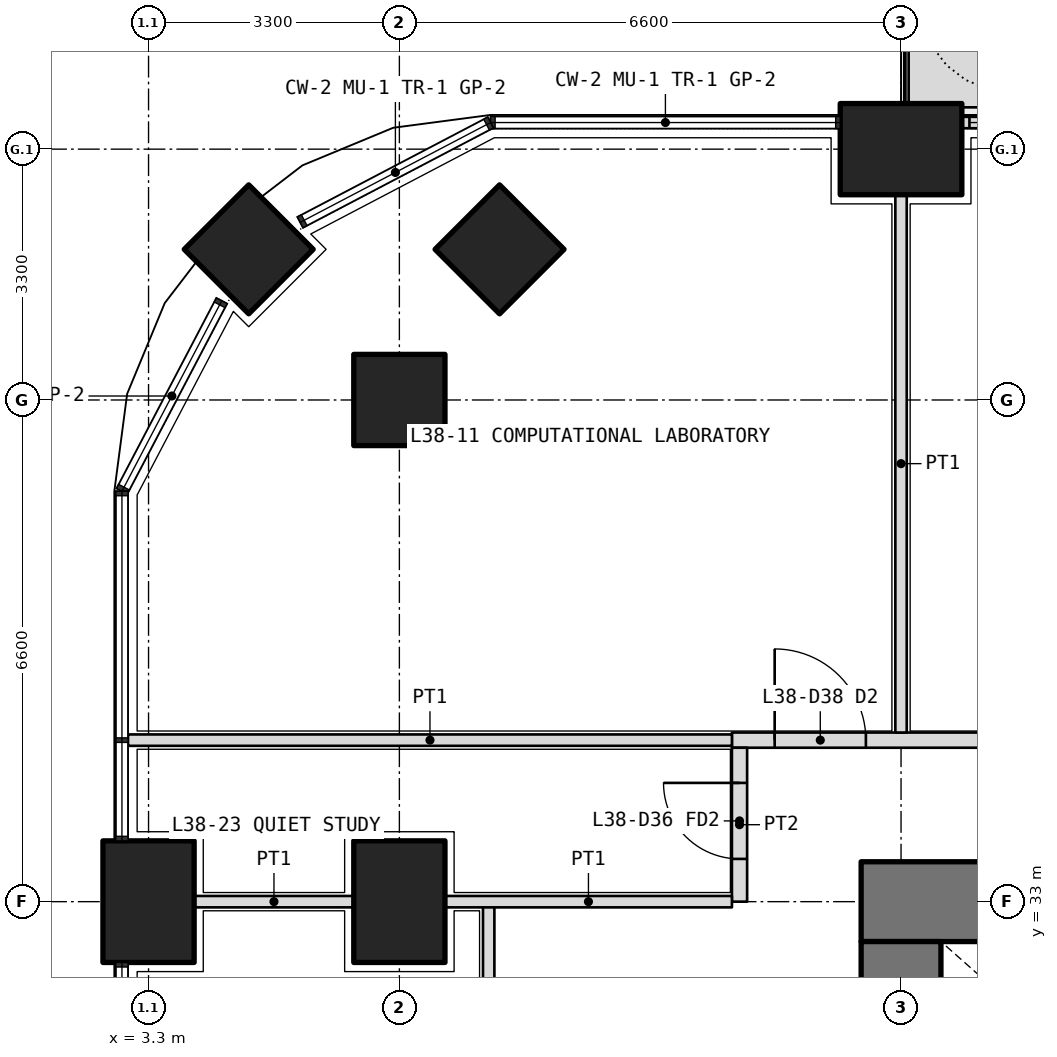
"""IFC4 building model, lengths in metres.
Left out: names, types, materials, properties, quantities, classifications, styles, units other than length and angle.
Written with IfcOpenShell. Run it as: python <this file> out.ifc"""

import sys

from ifc_helpers import new_model, si_unit, direction, frame, frame_2d, origin, origin_2d, place, context, subcontext, project, spatial, polyline, rectangle, outline, extrude, element, fill, save


model = new_model("IFC4")
c1 = context("Model", 3, precision=1e-05, world=origin(), true_north=direction((0.0, 1.0)))
c2 = subcontext(c1, "Body", "Model", "MODEL_VIEW")
j1 = project(units=[si_unit("LENGTHUNIT", "METRE"), si_unit("PLANEANGLEUNIT", "RADIAN")], contexts=[c1])
p1 = place(None, origin())
s1 = spatial("IfcSite", under=j1, at=p1, CompositionType="ELEMENT")
p2 = place(p1, origin())
s2 = spatial("IfcBuilding", under=s1, at=p2, CompositionType="ELEMENT")
p3 = place(p2, frame((0.0, 0.0, 168.3)))
s3 = spatial("IfcBuildingStorey", under=s2, at=p3, CompositionType="ELEMENT", Elevation=168.3)
p4 = place(p3, frame((4.618, 41.582, 0.0), z_axis=(0.0, 0.0, 1.0), x_axis=(0.707106781187, 0.707106781187, 0.0)))
e1 = element("IfcColumn", 1, at=p4, inside=s3, PredefinedType="COLUMN", context=c2, shape_type="SweptSolid", body=[
    extrude(rectangle(XDim=1.2, YDim=1.2, at=origin_2d()), origin(), (0.0, 0.0, 1.0), 4.2),
])
for number, where, z_axis, x_axis in (
    (2, (3.3, 33.0, 0.0), (0.0, 0.0, 1.0), (0.0, 1.0, 0.0)),
    (3, (13.2, 42.9, 0.0), (0.0, 0.0, 1.0), (1.0, 0.0, 0.0)),
):
    element("IfcColumn", number, at=place(p3, frame(where, z_axis=z_axis, x_axis=x_axis)), inside=s3, PredefinedType="COLUMN", context=c2, shape_type="SweptSolid", body=[
        extrude(rectangle(XDim=1.6, YDim=1.2, at=origin_2d()), origin(), (0.0, 0.0, 1.0), 4.2),
    ])
for number, where, z_axis, x_axis in (
    (4, (6.6, 39.6, 0.0), (0.0, 0.0, 1.0), (1.0, 0.0, 0.0)),
    (5, (7.918, 41.582, 0.0), (0.0, 0.0, 1.0), (0.707, 0.707, 0.0)),
):
    element("IfcColumn", number, at=place(p3, frame(where, z_axis=z_axis, x_axis=x_axis)), inside=s3, PredefinedType="COLUMN", context=c2, shape_type="SweptSolid", body=[
        extrude(rectangle(XDim=1.2, YDim=1.2, at=origin_2d()), origin(), (0.0, 0.0, 1.0), 4.2),
    ])
p5 = place(p3, frame((6.6, 33.0, 0.0), z_axis=(0.0, 0.0, 1.0), x_axis=(0.0, 1.0, 0.0)))
e6 = element("IfcColumn", 6, at=p5, inside=s3, PredefinedType="COLUMN", context=c2, shape_type="SweptSolid", body=[
    extrude(rectangle(XDim=1.6, YDim=1.2, at=origin_2d()), origin(), (0.0, 0.0, 1.0), 4.2),
])
p6 = place(p3, origin())
e7 = element("IfcWall", 7, at=p6, inside=s3, PredefinedType="USERDEFINED", context=c2, shape_type="SweptSolid", body=[
    extrude(outline(polyline([(13.3, 43.45), (15.75, 43.45), (15.75, 44.45), (13.3, 44.45), (13.3, 43.45)]), holes=[polyline([(13.45, 43.6), (15.6, 43.6), (15.6, 44.3), (13.45, 44.3), (13.45, 43.6)])]), origin(), (0.0, 0.0, 1.0), 1.05),
])
p7 = place(p3, frame((19.0, 43.25, 0.0), z_axis=(0.0, 0.0, 1.0), x_axis=(-1.0, 0.0, 0.0)))
e8 = element("IfcWall", 8, at=p7, inside=s3, PredefinedType="SOLIDWALL", context=c2, shape_type="SweptSolid", body=[
    extrude(rectangle(XDim=5.0, YDim=0.15, at=frame_2d((2.5, 0.0))), origin(), (0.0, 0.0, 1.0), 2.7),
])
p8 = place(p7, frame((1.25, 0.0, 0.0)))
e9 = element("IfcOpeningElement", 9, at=p8, cuts=e8, PredefinedType="OPENING", context=c2, shape_type="SweptSolid", body=[
    extrude(rectangle(XDim=1.0, YDim=2.4, at=frame_2d((0.5, 1.2))), frame((0.0, 0.085, 0.0), z_axis=(0.0, -1.0, 0.0), x_axis=(1.0, 0.0, 0.0)), (0.0, 0.0, 1.0), 0.17),
])
p9 = place(p7, frame((0.1, 0.0, 0.1)))
e10 = element("IfcOpeningElement", 10, at=p9, cuts=e8, PredefinedType="OPENING", context=c2, shape_type="SweptSolid", body=[
    extrude(rectangle(XDim=1.05, YDim=2.3, at=frame_2d((0.525, 1.15))), frame((0.0, 0.085, 0.0), z_axis=(0.0, -1.0, 0.0), x_axis=(1.0, 0.0, 0.0)), (0.0, 0.0, 1.0), 0.17),
])
p10 = place(p7, frame((2.75, 0.0, 0.1)))
e11 = element("IfcOpeningElement", 11, at=p10, cuts=e8, PredefinedType="OPENING", context=c2, shape_type="SweptSolid", body=[
    extrude(rectangle(XDim=2.15, YDim=2.3, at=frame_2d((1.075, 1.15))), frame((0.0, 0.085, 0.0), z_axis=(0.0, -1.0, 0.0), x_axis=(1.0, 0.0, 0.0)), (0.0, 0.0, 1.0), 0.17),
])
p11 = place(p3, frame((40.125, 33.0, 0.0), z_axis=(0.0, 0.0, 1.0), x_axis=(-1.0, 0.0, 0.0)))
e12 = element("IfcWall", 12, at=p11, inside=s3, PredefinedType="SHEAR", context=c2, shape_type="SweptSolid", body=[
    extrude(rectangle(XDim=27.45, YDim=1.05, at=frame_2d((13.725, 0.0))), origin(), (0.0, 0.0, 1.0), 4.2),
])
p12 = place(p3, frame((13.2, 32.475, 0.0), z_axis=(0.0, 0.0, 1.0), x_axis=(0.0, -1.0, 0.0)))
e13 = element("IfcWall", 13, at=p12, inside=s3, PredefinedType="SHEAR", context=c2, shape_type="SweptSolid", body=[
    extrude(rectangle(XDim=18.75, YDim=1.05, at=frame_2d((9.375, 0.0))), origin(), (0.0, 0.0, 1.0), 4.2),
])
p13 = place(p12, frame((14.125, 0.0, 0.0)))
e14 = element("IfcOpeningElement", 14, at=p13, cuts=e13, PredefinedType="OPENING", context=c2, shape_type="SweptSolid", body=[
    extrude(rectangle(XDim=1.6, YDim=2.1, at=frame_2d((0.8, 1.05))), frame((0.0, 0.535, 0.0), z_axis=(0.0, -1.0, 0.0), x_axis=(1.0, 0.0, 0.0)), (0.0, 0.0, 1.0), 1.07),
])
p14 = place(p12, frame((3.325, 0.0, 0.0)))
e15 = element("IfcOpeningElement", 15, at=p14, cuts=e13, PredefinedType="OPENING", context=c2, shape_type="SweptSolid", body=[
    extrude(rectangle(XDim=1.6, YDim=2.1, at=frame_2d((0.8, 1.05))), frame((0.0, 0.535, 0.0), z_axis=(0.0, -1.0, 0.0), x_axis=(1.0, 0.0, 0.0)), (0.0, 0.0, 1.0), 1.07),
])
p15 = place(p3, frame((10.975, 35.125, 0.0), z_axis=(0.0, 0.0, 1.0), x_axis=(1.0, 0.0, 0.0)))
e16 = element("IfcWall", 16, at=p15, inside=s3, PredefinedType="PARTITIONING", context=c2, shape_type="SweptSolid", body=[
    extrude(rectangle(XDim=30.85, YDim=0.2, at=frame_2d((15.425, 0.0))), origin(), (0.0, 0.0, 1.0), 2.85),
])
p16 = place(p15, frame((0.562, 0.0, 0.0)))
e17 = element("IfcOpeningElement", 17, at=p16, cuts=e16, PredefinedType="OPENING", context=c2, shape_type="SweptSolid", body=[
    extrude(rectangle(XDim=1.2, YDim=2.1, at=frame_2d((0.6, 1.05))), frame((0.0, 0.11, 0.0), z_axis=(0.0, -1.0, 0.0), x_axis=(1.0, 0.0, 0.0)), (0.0, 0.0, 1.0), 0.22),
])
p17 = place(p15, frame((8.225, 0.0, 0.0)))
e18 = element("IfcOpeningElement", 18, at=p17, cuts=e16, PredefinedType="OPENING", context=c2, shape_type="SweptSolid", body=[
    extrude(rectangle(XDim=1.2, YDim=2.1, at=frame_2d((0.6, 1.05))), frame((0.0, 0.11, 0.0), z_axis=(0.0, -1.0, 0.0), x_axis=(1.0, 0.0, 0.0)), (0.0, 0.0, 1.0), 0.22),
])
p18 = place(p15, frame((17.025, 0.0, 0.0)))
e19 = element("IfcOpeningElement", 19, at=p18, cuts=e16, PredefinedType="OPENING", context=c2, shape_type="SweptSolid", body=[
    extrude(rectangle(XDim=1.0, YDim=2.1, at=frame_2d((0.5, 1.05))), frame((0.0, 0.11, 0.0), z_axis=(0.0, -1.0, 0.0), x_axis=(1.0, 0.0, 0.0)), (0.0, 0.0, 1.0), 0.22),
])
p19 = place(p15, frame((20.325, 0.0, 0.0)))
e20 = element("IfcOpeningElement", 20, at=p19, cuts=e16, PredefinedType="OPENING", context=c2, shape_type="SweptSolid", body=[
    extrude(rectangle(XDim=1.0, YDim=2.1, at=frame_2d((0.5, 1.05))), frame((0.0, 0.11, 0.0), z_axis=(0.0, -1.0, 0.0), x_axis=(1.0, 0.0, 0.0)), (0.0, 0.0, 1.0), 0.22),
])
p20 = place(p15, frame((23.075, 0.0, 0.0)))
e21 = element("IfcOpeningElement", 21, at=p20, cuts=e16, PredefinedType="OPENING", context=c2, shape_type="SweptSolid", body=[
    extrude(rectangle(XDim=1.2, YDim=2.1, at=frame_2d((0.6, 1.05))), frame((0.0, 0.11, 0.0), z_axis=(0.0, -1.0, 0.0), x_axis=(1.0, 0.0, 0.0)), (0.0, 0.0, 1.0), 0.22),
])
p21 = place(p15, frame((27.438, 0.0, 0.0)))
e22 = element("IfcOpeningElement", 22, at=p21, cuts=e16, PredefinedType="OPENING", context=c2, shape_type="SweptSolid", body=[
    extrude(rectangle(XDim=1.2, YDim=2.1, at=frame_2d((0.6, 1.05))), frame((0.0, 0.11, 0.0), z_axis=(0.0, -1.0, 0.0), x_axis=(1.0, 0.0, 0.0)), (0.0, 0.0, 1.0), 0.22),
])
p22 = place(p3, frame((11.075, 33.0, 0.0), z_axis=(0.0, 0.0, 1.0), x_axis=(0.0, 1.0, 0.0)))
e23 = element("IfcWall", 23, at=p22, inside=s3, PredefinedType="PARTITIONING", context=c2, shape_type="SweptSolid", body=[
    extrude(rectangle(XDim=2.025, YDim=0.2, at=frame_2d((1.012, 0.0))), origin(), (0.0, 0.0, 1.0), 2.85),
])
p23 = place(p22, frame((0.562, 0.0, 0.0)))
e24 = element("IfcOpeningElement", 24, at=p23, cuts=e23, PredefinedType="OPENING", context=c2, shape_type="SweptSolid", body=[
    extrude(rectangle(XDim=1.0, YDim=2.1, at=frame_2d((0.5, 1.05))), frame((0.0, 0.11, 0.0), z_axis=(0.0, -1.0, 0.0), x_axis=(1.0, 0.0, 0.0)), (0.0, 0.0, 1.0), 0.22),
])
p24 = place(p3, frame((3.03, 35.125, 0.0), z_axis=(0.0, 0.0, 1.0), x_axis=(1.0, 0.0, 0.0)))
e25 = element("IfcWall", 25, at=p24, inside=s3, PredefinedType="PARTITIONING", context=c2, shape_type="SweptSolid", body=[
    extrude(rectangle(XDim=7.945, YDim=0.15, at=frame_2d((3.973, 0.0))), origin(), (0.0, 0.0, 1.0), 2.7),
])
p25 = place(p3, frame((13.2, 42.3, 0.0), z_axis=(0.0, 0.0, 1.0), x_axis=(0.0, -1.0, 0.0)))
e26 = element("IfcWall", 26, at=p25, inside=s3, PredefinedType="PARTITIONING", context=c2, shape_type="SweptSolid", body=[
    extrude(rectangle(XDim=7.075, YDim=0.15, at=frame_2d((3.538, 0.0))), origin(), (0.0, 0.0, 1.0), 2.85),
])
p26 = place(p3, frame((7.775, 26.4, 0.0), z_axis=(0.0, 0.0, 1.0), x_axis=(0.0, 1.0, 0.0)))
e27 = element("IfcWall", 27, at=p26, inside=s3, PredefinedType="PARTITIONING", context=c2, shape_type="SweptSolid", body=[
    extrude(rectangle(XDim=6.6, YDim=0.15, at=frame_2d((3.3, 0.0))), origin(), (0.0, 0.0, 1.0), 2.85),
])
p27 = place(p26, frame((2.7, 0.0, 0.0)))
e28 = element("IfcOpeningElement", 28, at=p27, cuts=e27, PredefinedType="OPENING", context=c2, shape_type="SweptSolid", body=[
    extrude(rectangle(XDim=1.2, YDim=2.1, at=frame_2d((0.6, 1.05))), frame((0.0, 0.085, 0.0), z_axis=(0.0, -1.0, 0.0), x_axis=(1.0, 0.0, 0.0)), (0.0, 0.0, 1.0), 0.17),
])
p28 = place(p3, frame((3.9, 33.0, 0.0), z_axis=(0.0, 0.0, 1.0), x_axis=(1.0, 0.0, 0.0)))
e29 = element("IfcWall", 29, at=p28, inside=s3, PredefinedType="PARTITIONING", context=c2, shape_type="SweptSolid", body=[
    extrude(rectangle(XDim=2.1, YDim=0.15, at=frame_2d((1.05, 0.0))), origin(), (0.0, 0.0, 1.0), 2.85),
])
p29 = place(p3, frame((7.2, 33.0, 0.0), z_axis=(0.0, 0.0, 1.0), x_axis=(1.0, 0.0, 0.0)))
e30 = element("IfcWall", 30, at=p29, inside=s3, PredefinedType="PARTITIONING", context=c2, shape_type="SweptSolid", body=[
    extrude(rectangle(XDim=3.775, YDim=0.15, at=frame_2d((1.888, 0.0))), origin(), (0.0, 0.0, 1.0), 2.85),
])
p30 = place(p10, origin())
e31 = element("IfcWindow", 31, at=p30, inside=s3, PartitioningType="SINGLE_PANEL", PredefinedType="WINDOW", context=c2, shape_type="SweptSolid", body=[
    extrude(rectangle(XDim=2.15, YDim=2.3, at=frame_2d((1.075, 1.15))), frame((0.0, 0.03, 0.0), z_axis=(0.0, -1.0, 0.0), x_axis=(1.0, 0.0, 0.0)), (0.0, 0.0, 1.0), 0.06),
])
fill(e11, e31)
p31 = place(p16, origin())
e32 = element("IfcDoor", 32, at=p31, inside=s3, OperationType="DOUBLE_DOOR_SINGLE_SWING", PredefinedType="DOOR", context=c2, shape_type="SweptSolid", body=[
    extrude(rectangle(XDim=1.2, YDim=2.1, at=frame_2d((0.6, 1.05))), frame((0.0, 0.025, 0.0), z_axis=(0.0, -1.0, 0.0), x_axis=(1.0, 0.0, 0.0)), (0.0, 0.0, 1.0), 0.05),
])
fill(e17, e32)
p32 = place(p23, origin())
e33 = element("IfcDoor", 33, at=p32, inside=s3, OperationType="SINGLE_SWING_RIGHT", PredefinedType="DOOR", context=c2, shape_type="SweptSolid", body=[
    extrude(rectangle(XDim=1.0, YDim=2.1, at=frame_2d((0.5, 1.05))), frame((0.0, 0.025, 0.0), z_axis=(0.0, -1.0, 0.0), x_axis=(1.0, 0.0, 0.0)), (0.0, 0.0, 1.0), 0.05),
])
fill(e24, e33)
save(model, sys.argv[1])
